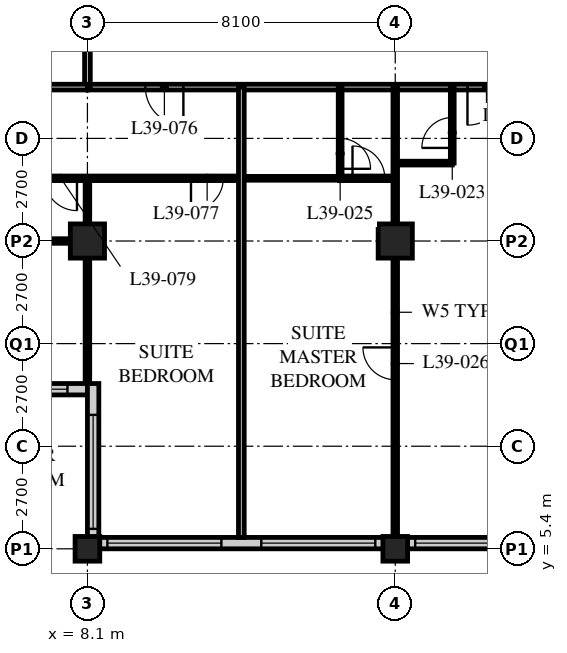
"""IFC4 building model, lengths in metres.
Left out: names, types, materials, properties, quantities, classifications, styles, units other than length and angle.
Written with IfcOpenShell. Run it as: python <this file> out.ifc"""

import sys

from ifc_helpers import new_model, si_unit, direction, frame, frame_2d, origin, origin_2d, place, context, subcontext, project, spatial, rectangle, hollow_rectangle, extrude, element, fill, save


model = new_model("IFC4")
c1 = context("Model", 3, precision=1e-05, world=origin(), true_north=direction((0.0, 1.0)))
c2 = subcontext(c1, "Body", "Model", "MODEL_VIEW")
j1 = project(units=[si_unit("LENGTHUNIT", "METRE"), si_unit("PLANEANGLEUNIT", "RADIAN")], contexts=[c1])
p1 = place(None, origin())
s1 = spatial("IfcSite", under=j1, at=p1, CompositionType="ELEMENT")
p2 = place(p1, origin())
s2 = spatial("IfcBuilding", under=s1, at=p2, CompositionType="ELEMENT")
p3 = place(p2, frame((0.0, 0.0, 151.0)))
s3 = spatial("IfcBuildingStorey", under=s2, at=p3, CompositionType="ELEMENT", Elevation=151.0)
p4 = place(p3, frame((8.1, 5.4, 0.0), z_axis=(0.0, 0.0, 1.0), x_axis=(1.0, 0.0, 0.0)))
e1 = element("IfcColumn", 1, at=p4, inside=s3, PredefinedType="COLUMN", context=c2, shape_type="SweptSolid", body=[
    extrude(hollow_rectangle(XDim=0.65, YDim=0.65, WallThickness=0.055, at=origin_2d()), origin(), (0.0, 0.0, 1.0), 3.4),
])
p5 = place(p3, frame((8.1, 13.5, 0.0), z_axis=(0.0, 0.0, 1.0), x_axis=(1.0, 0.0, 0.0)))
e2 = element("IfcColumn", 2, at=p5, inside=s3, PredefinedType="COLUMN", context=c2, shape_type="SweptSolid", body=[
    extrude(hollow_rectangle(XDim=0.9, YDim=0.9, WallThickness=0.1, at=origin_2d()), origin(), (0.0, 0.0, 1.0), 3.4),
])
p6 = place(p3, frame((16.2, 5.4, 0.0), z_axis=(0.0, 0.0, 1.0), x_axis=(1.0, 0.0, 0.0)))
e3 = element("IfcColumn", 3, at=p6, inside=s3, PredefinedType="COLUMN", context=c2, shape_type="SweptSolid", body=[
    extrude(hollow_rectangle(XDim=0.65, YDim=0.65, WallThickness=0.055, at=origin_2d()), origin(), (0.0, 0.0, 1.0), 3.4),
])
p7 = place(p3, frame((16.2, 13.5, 0.0), z_axis=(0.0, 0.0, 1.0), x_axis=(1.0, 0.0, 0.0)))
e4 = element("IfcColumn", 4, at=p7, inside=s3, PredefinedType="COLUMN", context=c2, shape_type="SweptSolid", body=[
    extrude(hollow_rectangle(XDim=0.9, YDim=0.9, WallThickness=0.1, at=origin_2d()), origin(), (0.0, 0.0, 1.0), 3.4),
])
p8 = place(p3, frame((8.4, 5.55, 0.0), z_axis=(0.0, 0.0, 1.0), x_axis=(1.0, 0.0, 0.0)))
e5 = element("IfcWall", 5, at=p8, inside=s3, PredefinedType="SOLIDWALL", context=c2, shape_type="SweptSolid", body=[
    extrude(rectangle(XDim=40.2, YDim=0.3, at=frame_2d((20.1, 0.0))), origin(), (0.0, 0.0, 1.0), 3.19),
])
p9 = place(p8, frame((0.225, 0.0, 0.9)))
e6 = element("IfcOpeningElement", 6, at=p9, cuts=e5, PredefinedType="OPENING", context=c2, shape_type="SweptSolid", body=[
    extrude(rectangle(XDim=3.0, YDim=1.4, at=frame_2d((1.5, 0.7))), frame((0.0, 0.16, 0.0), z_axis=(0.0, -1.0, 0.0), x_axis=(1.0, 0.0, 0.0)), (0.0, 0.0, 1.0), 0.32),
])
p10 = place(p8, frame((4.275, 0.0, 0.9)))
e7 = element("IfcOpeningElement", 7, at=p10, cuts=e5, PredefinedType="OPENING", context=c2, shape_type="SweptSolid", body=[
    extrude(rectangle(XDim=3.0, YDim=1.4, at=frame_2d((1.5, 0.7))), frame((0.0, 0.16, 0.0), z_axis=(0.0, -1.0, 0.0), x_axis=(1.0, 0.0, 0.0)), (0.0, 0.0, 1.0), 0.32),
])
p11 = place(p8, frame((8.325, 0.0, 0.9)))
e8 = element("IfcOpeningElement", 8, at=p11, cuts=e5, PredefinedType="OPENING", context=c2, shape_type="SweptSolid", body=[
    extrude(rectangle(XDim=3.0, YDim=1.4, at=frame_2d((1.5, 0.7))), frame((0.0, 0.16, 0.0), z_axis=(0.0, -1.0, 0.0), x_axis=(1.0, 0.0, 0.0)), (0.0, 0.0, 1.0), 0.32),
])
p12 = place(p8, frame((12.375, 0.0, 0.9)))
e9 = element("IfcOpeningElement", 9, at=p12, cuts=e5, PredefinedType="OPENING", context=c2, shape_type="SweptSolid", body=[
    extrude(rectangle(XDim=3.0, YDim=1.4, at=frame_2d((1.5, 0.7))), frame((0.0, 0.16, 0.0), z_axis=(0.0, -1.0, 0.0), x_axis=(1.0, 0.0, 0.0)), (0.0, 0.0, 1.0), 0.32),
])
p13 = place(p8, frame((16.425, 0.0, 0.9)))
e10 = element("IfcOpeningElement", 10, at=p13, cuts=e5, PredefinedType="OPENING", context=c2, shape_type="SweptSolid", body=[
    extrude(rectangle(XDim=3.0, YDim=1.4, at=frame_2d((1.5, 0.7))), frame((0.0, 0.16, 0.0), z_axis=(0.0, -1.0, 0.0), x_axis=(1.0, 0.0, 0.0)), (0.0, 0.0, 1.0), 0.32),
])
p14 = place(p8, frame((20.475, 0.0, 0.9)))
e11 = element("IfcOpeningElement", 11, at=p14, cuts=e5, PredefinedType="OPENING", context=c2, shape_type="SweptSolid", body=[
    extrude(rectangle(XDim=3.0, YDim=1.4, at=frame_2d((1.5, 0.7))), frame((0.0, 0.16, 0.0), z_axis=(0.0, -1.0, 0.0), x_axis=(1.0, 0.0, 0.0)), (0.0, 0.0, 1.0), 0.32),
])
p15 = place(p8, frame((24.525, 0.0, 0.9)))
e12 = element("IfcOpeningElement", 12, at=p15, cuts=e5, PredefinedType="OPENING", context=c2, shape_type="SweptSolid", body=[
    extrude(rectangle(XDim=3.0, YDim=1.4, at=frame_2d((1.5, 0.7))), frame((0.0, 0.16, 0.0), z_axis=(0.0, -1.0, 0.0), x_axis=(1.0, 0.0, 0.0)), (0.0, 0.0, 1.0), 0.32),
])
p16 = place(p8, frame((28.575, 0.0, 0.9)))
e13 = element("IfcOpeningElement", 13, at=p16, cuts=e5, PredefinedType="OPENING", context=c2, shape_type="SweptSolid", body=[
    extrude(rectangle(XDim=3.0, YDim=1.4, at=frame_2d((1.5, 0.7))), frame((0.0, 0.16, 0.0), z_axis=(0.0, -1.0, 0.0), x_axis=(1.0, 0.0, 0.0)), (0.0, 0.0, 1.0), 0.32),
])
p17 = place(p8, frame((32.625, 0.0, 0.9)))
e14 = element("IfcOpeningElement", 14, at=p17, cuts=e5, PredefinedType="OPENING", context=c2, shape_type="SweptSolid", body=[
    extrude(rectangle(XDim=3.0, YDim=1.4, at=frame_2d((1.5, 0.7))), frame((0.0, 0.16, 0.0), z_axis=(0.0, -1.0, 0.0), x_axis=(1.0, 0.0, 0.0)), (0.0, 0.0, 1.0), 0.32),
])
p18 = place(p8, frame((36.675, 0.0, 0.9)))
e15 = element("IfcOpeningElement", 15, at=p18, cuts=e5, PredefinedType="OPENING", context=c2, shape_type="SweptSolid", body=[
    extrude(rectangle(XDim=3.0, YDim=1.4, at=frame_2d((1.5, 0.7))), frame((0.0, 0.16, 0.0), z_axis=(0.0, -1.0, 0.0), x_axis=(1.0, 0.0, 0.0)), (0.0, 0.0, 1.0), 0.32),
])
p19 = place(p3, frame((4.35, 9.6, 0.0), z_axis=(0.0, 0.0, 1.0), x_axis=(1.0, 0.0, 0.0)))
e16 = element("IfcWall", 16, at=p19, inside=s3, PredefinedType="SOLIDWALL", context=c2, shape_type="SweptSolid", body=[
    extrude(rectangle(XDim=3.75, YDim=0.3, at=frame_2d((1.875, 0.0))), origin(), (0.0, 0.0, 1.0), 3.19),
])
p20 = place(p19, frame((0.225, 0.0, 0.9)))
e17 = element("IfcOpeningElement", 17, at=p20, cuts=e16, PredefinedType="OPENING", context=c2, shape_type="SweptSolid", body=[
    extrude(rectangle(XDim=3.0, YDim=1.4, at=frame_2d((1.5, 0.7))), frame((0.0, 0.16, 0.0), z_axis=(0.0, -1.0, 0.0), x_axis=(1.0, 0.0, 0.0)), (0.0, 0.0, 1.0), 0.32),
])
p21 = place(p3, frame((8.25, 9.75, 0.0), z_axis=(0.0, 0.0, 1.0), x_axis=(0.0, -1.0, 0.0)))
e18 = element("IfcWall", 18, at=p21, inside=s3, PredefinedType="SOLIDWALL", context=c2, shape_type="SweptSolid", body=[
    extrude(rectangle(XDim=4.35, YDim=0.3, at=frame_2d((2.175, 0.0))), origin(), (0.0, 0.0, 1.0), 3.19),
])
p22 = place(p21, frame((0.825, 0.0, 0.9)))
e19 = element("IfcOpeningElement", 19, at=p22, cuts=e18, PredefinedType="OPENING", context=c2, shape_type="SweptSolid", body=[
    extrude(rectangle(XDim=3.0, YDim=1.4, at=frame_2d((1.5, 0.7))), frame((0.0, 0.16, 0.0), z_axis=(0.0, -1.0, 0.0), x_axis=(1.0, 0.0, 0.0)), (0.0, 0.0, 1.0), 0.32),
])
p23 = place(p3, frame((8.1, 17.55, 0.0), z_axis=(0.0, 0.0, 1.0), x_axis=(1.0, 0.0, 0.0)))
e20 = element("IfcWall", 20, at=p23, inside=s3, PredefinedType="PARTITIONING", context=c2, shape_type="SweptSolid", body=[
    extrude(rectangle(XDim=40.5, YDim=0.15, at=frame_2d((20.25, 0.0))), origin(), (0.0, 0.0, 1.0), 3.19),
])
p24 = place(p23, frame((10.0, 0.0, 0.0)))
e21 = element("IfcOpeningElement", 21, at=p24, cuts=e20, PredefinedType="OPENING", context=c2, shape_type="SweptSolid", body=[
    extrude(rectangle(XDim=1.0, YDim=2.1, at=frame_2d((0.5, 1.05))), frame((0.0, 0.085, 0.0), z_axis=(0.0, -1.0, 0.0), x_axis=(1.0, 0.0, 0.0)), (0.0, 0.0, 1.0), 0.17),
])
p25 = place(p23, frame((22.15, 0.0, 0.0)))
e22 = element("IfcOpeningElement", 22, at=p25, cuts=e20, PredefinedType="OPENING", context=c2, shape_type="SweptSolid", body=[
    extrude(rectangle(XDim=1.0, YDim=2.1, at=frame_2d((0.5, 1.05))), frame((0.0, 0.085, 0.0), z_axis=(0.0, -1.0, 0.0), x_axis=(1.0, 0.0, 0.0)), (0.0, 0.0, 1.0), 0.17),
])
p26 = place(p23, frame((30.8, 0.0, 0.0)))
e23 = element("IfcOpeningElement", 23, at=p26, cuts=e20, PredefinedType="OPENING", context=c2, shape_type="SweptSolid", body=[
    extrude(rectangle(XDim=1.0, YDim=2.1, at=frame_2d((0.5, 1.05))), frame((0.0, 0.085, 0.0), z_axis=(0.0, -1.0, 0.0), x_axis=(1.0, 0.0, 0.0)), (0.0, 0.0, 1.0), 0.17),
])
p27 = place(p23, frame((34.85, 0.0, 0.0)))
e24 = element("IfcOpeningElement", 24, at=p27, cuts=e20, PredefinedType="OPENING", context=c2, shape_type="SweptSolid", body=[
    extrude(rectangle(XDim=1.0, YDim=2.1, at=frame_2d((0.5, 1.05))), frame((0.0, 0.085, 0.0), z_axis=(0.0, -1.0, 0.0), x_axis=(1.0, 0.0, 0.0)), (0.0, 0.0, 1.0), 0.17),
])
p28 = place(p23, frame((1.525, 0.0, 0.0)))
e25 = element("IfcOpeningElement", 25, at=p28, cuts=e20, PredefinedType="OPENING", context=c2, shape_type="SweptSolid", body=[
    extrude(rectangle(XDim=1.0, YDim=2.1, at=frame_2d((0.5, 1.05))), frame((0.0, 0.085, 0.0), z_axis=(0.0, -1.0, 0.0), x_axis=(1.0, 0.0, 0.0)), (0.0, 0.0, 1.0), 0.17),
])
p29 = place(p23, frame((37.975, 0.0, 0.0)))
e26 = element("IfcOpeningElement", 26, at=p29, cuts=e20, PredefinedType="OPENING", context=c2, shape_type="SweptSolid", body=[
    extrude(rectangle(XDim=1.0, YDim=2.1, at=frame_2d((0.5, 1.05))), frame((0.0, 0.085, 0.0), z_axis=(0.0, -1.0, 0.0), x_axis=(1.0, 0.0, 0.0)), (0.0, 0.0, 1.0), 0.17),
])
p30 = place(p3, frame((8.1, 17.55, 0.0), z_axis=(0.0, 0.0, 1.0), x_axis=(0.0, 1.0, 0.0)))
e27 = element("IfcWall", 27, at=p30, inside=s3, PredefinedType="PARTITIONING", context=c2, shape_type="SweptSolid", body=[
    extrude(rectangle(XDim=28.35, YDim=0.15, at=frame_2d((14.175, 0.0))), origin(), (0.0, 0.0, 1.0), 2.42),
])
p31 = place(p30, frame((5.95, 0.0, 0.0)))
e28 = element("IfcOpeningElement", 28, at=p31, cuts=e27, PredefinedType="OPENING", context=c2, shape_type="SweptSolid", body=[
    extrude(rectangle(XDim=1.0, YDim=2.1, at=frame_2d((0.5, 1.05))), frame((0.0, 0.085, 0.0), z_axis=(0.0, -1.0, 0.0), x_axis=(1.0, 0.0, 0.0)), (0.0, 0.0, 1.0), 0.17),
])
p32 = place(p30, frame((16.8, 0.0, 0.0)))
e29 = element("IfcOpeningElement", 29, at=p32, cuts=e27, PredefinedType="OPENING", context=c2, shape_type="SweptSolid", body=[
    extrude(rectangle(XDim=1.0, YDim=2.1, at=frame_2d((0.5, 1.05))), frame((0.0, 0.085, 0.0), z_axis=(0.0, -1.0, 0.0), x_axis=(1.0, 0.0, 0.0)), (0.0, 0.0, 1.0), 0.17),
])
p33 = place(p30, frame((22.7, 0.0, 0.0)))
e30 = element("IfcOpeningElement", 30, at=p33, cuts=e27, PredefinedType="OPENING", context=c2, shape_type="SweptSolid", body=[
    extrude(rectangle(XDim=1.0, YDim=2.1, at=frame_2d((0.5, 1.05))), frame((0.0, 0.085, 0.0), z_axis=(0.0, -1.0, 0.0), x_axis=(1.0, 0.0, 0.0)), (0.0, 0.0, 1.0), 0.17),
])
p34 = place(p30, frame((24.9, 0.0, 0.0)))
e31 = element("IfcOpeningElement", 31, at=p34, cuts=e27, PredefinedType="OPENING", context=c2, shape_type="SweptSolid", body=[
    extrude(rectangle(XDim=1.0, YDim=2.1, at=frame_2d((0.5, 1.05))), frame((0.0, 0.085, 0.0), z_axis=(0.0, -1.0, 0.0), x_axis=(1.0, 0.0, 0.0)), (0.0, 0.0, 1.0), 0.17),
])
p35 = place(p3, frame((16.2, 15.55, 0.0), z_axis=(0.0, 0.0, 1.0), x_axis=(1.0, 0.0, 0.0)))
e32 = element("IfcWall", 32, at=p35, inside=s3, PredefinedType="PARTITIONING", context=c2, shape_type="SweptSolid", body=[
    extrude(rectangle(XDim=1.5, YDim=0.1, at=frame_2d((0.75, 0.0))), origin(), (0.0, 0.0, 1.0), 3.19),
])
p36 = place(p3, frame((17.7, 17.55, 0.0), z_axis=(0.0, 0.0, 1.0), x_axis=(0.0, -1.0, 0.0)))
e33 = element("IfcWall", 33, at=p36, inside=s3, PredefinedType="PARTITIONING", context=c2, shape_type="SweptSolid", body=[
    extrude(rectangle(XDim=2.0, YDim=0.1, at=frame_2d((1.0, 0.0))), origin(), (0.0, 0.0, 1.0), 3.19),
])
p37 = place(p36, frame((0.8, 0.0, 0.0)))
e34 = element("IfcOpeningElement", 34, at=p37, cuts=e33, PredefinedType="OPENING", context=c2, shape_type="SweptSolid", body=[
    extrude(rectangle(XDim=0.8, YDim=2.1, at=frame_2d((0.4, 1.05))), frame((0.0, 0.06, 0.0), z_axis=(0.0, -1.0, 0.0), x_axis=(1.0, 0.0, 0.0)), (0.0, 0.0, 1.0), 0.12),
])
p38 = place(p3, frame((12.15, 15.15, 0.0), z_axis=(0.0, 0.0, 1.0), x_axis=(1.0, 0.0, 0.0)))
e35 = element("IfcWall", 35, at=p38, inside=s3, PredefinedType="PARTITIONING", context=c2, shape_type="SweptSolid", body=[
    extrude(rectangle(XDim=2.6, YDim=0.1, at=frame_2d((1.3, 0.0))), origin(), (0.0, 0.0, 1.0), 3.19),
])
p39 = place(p3, frame((14.75, 17.55, 0.0), z_axis=(0.0, 0.0, 1.0), x_axis=(0.0, -1.0, 0.0)))
e36 = element("IfcWall", 36, at=p39, inside=s3, PredefinedType="PARTITIONING", context=c2, shape_type="SweptSolid", body=[
    extrude(rectangle(XDim=2.4, YDim=0.1, at=frame_2d((1.2, 0.0))), origin(), (0.0, 0.0, 1.0), 3.19),
])
p40 = place(p39, frame((1.35, 0.0, 0.0)))
e37 = element("IfcOpeningElement", 37, at=p40, cuts=e36, PredefinedType="OPENING", context=c2, shape_type="SweptSolid", body=[
    extrude(rectangle(XDim=0.8, YDim=2.1, at=frame_2d((0.4, 1.05))), frame((0.0, 0.06, 0.0), z_axis=(0.0, -1.0, 0.0), x_axis=(1.0, 0.0, 0.0)), (0.0, 0.0, 1.0), 0.12),
])
p41 = place(p3, frame((16.2, 17.55, 0.0), z_axis=(0.0, 0.0, 1.0), x_axis=(0.0, -1.0, 0.0)))
e38 = element("IfcWall", 38, at=p41, inside=s3, PredefinedType="PARTITIONING", context=c2, shape_type="SweptSolid", body=[
    extrude(rectangle(XDim=11.85, YDim=0.12, at=frame_2d((5.925, 0.0))), origin(), (0.0, 0.0, 1.0), 2.42),
])
p42 = place(p41, frame((6.85, 0.0, 0.0)))
e39 = element("IfcOpeningElement", 39, at=p42, cuts=e38, PredefinedType="OPENING", context=c2, shape_type="SweptSolid", body=[
    extrude(rectangle(XDim=0.85, YDim=2.1, at=frame_2d((0.425, 1.05))), frame((0.0, 0.07, 0.0), z_axis=(0.0, -1.0, 0.0), x_axis=(1.0, 0.0, 0.0)), (0.0, 0.0, 1.0), 0.14),
])
p43 = place(p3, frame((4.1, 15.15, 0.0), z_axis=(0.0, 0.0, 1.0), x_axis=(1.0, 0.0, 0.0)))
e40 = element("IfcWall", 40, at=p43, inside=s3, PredefinedType="PARTITIONING", context=c2, shape_type="SweptSolid", body=[
    extrude(rectangle(XDim=8.05, YDim=0.12, at=frame_2d((4.025, 0.0))), origin(), (0.0, 0.0, 1.0), 3.19),
])
p44 = place(p43, frame((6.725, 0.0, 0.0)))
e41 = element("IfcOpeningElement", 41, at=p44, cuts=e40, PredefinedType="OPENING", context=c2, shape_type="SweptSolid", body=[
    extrude(rectangle(XDim=0.85, YDim=2.1, at=frame_2d((0.425, 1.05))), frame((0.0, 0.07, 0.0), z_axis=(0.0, -1.0, 0.0), x_axis=(1.0, 0.0, 0.0)), (0.0, 0.0, 1.0), 0.14),
])
p45 = place(p43, frame((2.875, 0.0, 0.0)))
e42 = element("IfcOpeningElement", 42, at=p45, cuts=e40, PredefinedType="OPENING", context=c2, shape_type="SweptSolid", body=[
    extrude(rectangle(XDim=0.85, YDim=2.1, at=frame_2d((0.425, 1.05))), frame((0.0, 0.07, 0.0), z_axis=(0.0, -1.0, 0.0), x_axis=(1.0, 0.0, 0.0)), (0.0, 0.0, 1.0), 0.14),
])
p46 = place(p3, frame((8.1, 15.15, 0.0), z_axis=(0.0, 0.0, 1.0), x_axis=(0.0, -1.0, 0.0)))
e43 = element("IfcWall", 43, at=p46, inside=s3, PredefinedType="PARTITIONING", context=c2, shape_type="SweptSolid", body=[
    extrude(rectangle(XDim=5.4, YDim=0.12, at=frame_2d((2.7, 0.0))), origin(), (0.0, 0.0, 1.0), 2.42),
])
p47 = place(p3, frame((8.1, 13.5, 0.0), z_axis=(0.0, 0.0, 1.0), x_axis=(-1.0, 0.0, 0.0)))
e44 = element("IfcWall", 44, at=p47, inside=s3, PredefinedType="PARTITIONING", context=c2, shape_type="SweptSolid", body=[
    extrude(rectangle(XDim=3.75, YDim=0.12, at=frame_2d((1.875, 0.0))), origin(), (0.0, 0.0, 1.0), 2.42),
])
p48 = place(p47, frame((1.875, 0.0, 0.0)))
e45 = element("IfcOpeningElement", 45, at=p48, cuts=e44, PredefinedType="OPENING", context=c2, shape_type="SweptSolid", body=[
    extrude(rectangle(XDim=0.85, YDim=2.1, at=frame_2d((0.425, 1.05))), frame((0.0, 0.07, 0.0), z_axis=(0.0, -1.0, 0.0), x_axis=(1.0, 0.0, 0.0)), (0.0, 0.0, 1.0), 0.14),
])
p49 = place(p3, frame((0.3, 17.55, 0.0), z_axis=(0.0, 0.0, 1.0), x_axis=(1.0, 0.0, 0.0)))
e46 = element("IfcWall", 46, at=p49, inside=s3, PredefinedType="PARTITIONING", context=c2, shape_type="SweptSolid", body=[
    extrude(rectangle(XDim=7.8, YDim=0.15, at=frame_2d((3.9, 0.0))), origin(), (0.0, 0.0, 1.0), 3.19),
])
p50 = place(p3, frame((12.15, 17.55, 0.0), z_axis=(0.0, 0.0, 1.0), x_axis=(0.0, -1.0, 0.0)))
e47 = element("IfcWall", 47, at=p50, inside=s3, PredefinedType="PARTITIONING", context=c2, shape_type="SweptSolid", body=[
    extrude(rectangle(XDim=11.85, YDim=0.15, at=frame_2d((5.925, 0.0))), origin(), (0.0, 0.0, 1.0), 3.19),
])
p51 = place(p3, frame((16.2, 15.15, 0.0), z_axis=(0.0, 0.0, 1.0), x_axis=(-1.0, 0.0, 0.0)))
e48 = element("IfcWall", 48, at=p51, inside=s3, PredefinedType="PARTITIONING", context=c2, shape_type="SweptSolid", body=[
    extrude(rectangle(XDim=1.46, YDim=0.12, at=frame_2d((0.73, 0.0))), origin(), (0.0, 0.0, 1.0), 3.19),
])
p52 = place(p51, frame((0.275, 0.0, 0.0)))
e49 = element("IfcOpeningElement", 49, at=p52, cuts=e48, PredefinedType="OPENING", context=c2, shape_type="SweptSolid", body=[
    extrude(rectangle(XDim=0.85, YDim=2.1, at=frame_2d((0.425, 1.05))), frame((0.0, 0.07, 0.0), z_axis=(0.0, -1.0, 0.0), x_axis=(1.0, 0.0, 0.0)), (0.0, 0.0, 1.0), 0.14),
])
p53 = place(p9, origin())
e50 = element("IfcWindow", 50, at=p53, inside=s3, PartitioningType="SINGLE_PANEL", PredefinedType="WINDOW", context=c2, shape_type="SweptSolid", body=[
    extrude(rectangle(XDim=3.0, YDim=1.4, at=frame_2d((1.5, 0.7))), frame((0.0, 0.03, 0.0), z_axis=(0.0, -1.0, 0.0), x_axis=(1.0, 0.0, 0.0)), (0.0, 0.0, 1.0), 0.06),
])
fill(e6, e50)
p54 = place(p10, origin())
e51 = element("IfcWindow", 51, at=p54, inside=s3, PartitioningType="SINGLE_PANEL", PredefinedType="WINDOW", context=c2, shape_type="SweptSolid", body=[
    extrude(rectangle(XDim=3.0, YDim=1.4, at=frame_2d((1.5, 0.7))), frame((0.0, 0.03, 0.0), z_axis=(0.0, -1.0, 0.0), x_axis=(1.0, 0.0, 0.0)), (0.0, 0.0, 1.0), 0.06),
])
fill(e7, e51)
p55 = place(p11, origin())
e52 = element("IfcWindow", 52, at=p55, inside=s3, PartitioningType="SINGLE_PANEL", PredefinedType="WINDOW", context=c2, shape_type="SweptSolid", body=[
    extrude(rectangle(XDim=3.0, YDim=1.4, at=frame_2d((1.5, 0.7))), frame((0.0, 0.03, 0.0), z_axis=(0.0, -1.0, 0.0), x_axis=(1.0, 0.0, 0.0)), (0.0, 0.0, 1.0), 0.06),
])
fill(e8, e52)
p56 = place(p20, origin())
e53 = element("IfcWindow", 53, at=p56, inside=s3, PartitioningType="SINGLE_PANEL", PredefinedType="WINDOW", context=c2, shape_type="SweptSolid", body=[
    extrude(rectangle(XDim=3.0, YDim=1.4, at=frame_2d((1.5, 0.7))), frame((0.0, 0.03, 0.0), z_axis=(0.0, -1.0, 0.0), x_axis=(1.0, 0.0, 0.0)), (0.0, 0.0, 1.0), 0.06),
])
fill(e17, e53)
p57 = place(p22, origin())
e54 = element("IfcWindow", 54, at=p57, inside=s3, PartitioningType="SINGLE_PANEL", PredefinedType="WINDOW", context=c2, shape_type="SweptSolid", body=[
    extrude(rectangle(XDim=3.0, YDim=1.4, at=frame_2d((1.5, 0.7))), frame((0.0, 0.03, 0.0), z_axis=(0.0, -1.0, 0.0), x_axis=(1.0, 0.0, 0.0)), (0.0, 0.0, 1.0), 0.06),
])
fill(e19, e54)
p58 = place(p37, origin())
e55 = element("IfcDoor", 55, at=p58, inside=s3, OperationType="SINGLE_SWING_LEFT", PredefinedType="DOOR", context=c2, shape_type="SweptSolid", body=[
    extrude(rectangle(XDim=0.8, YDim=2.1, at=frame_2d((0.4, 1.05))), frame((0.0, 0.025, 0.0), z_axis=(0.0, -1.0, 0.0), x_axis=(1.0, 0.0, 0.0)), (0.0, 0.0, 1.0), 0.05),
])
fill(e34, e55)
p59 = place(p24, origin())
e56 = element("IfcDoor", 56, at=p59, inside=s3, OperationType="SINGLE_SWING_RIGHT", PredefinedType="DOOR", context=c2, shape_type="SweptSolid", body=[
    extrude(rectangle(XDim=1.0, YDim=2.1, at=frame_2d((0.5, 1.05))), frame((0.0, 0.025, 0.0), z_axis=(0.0, -1.0, 0.0), x_axis=(1.0, 0.0, 0.0)), (0.0, 0.0, 1.0), 0.05),
])
fill(e21, e56)
p60 = place(p40, origin())
e57 = element("IfcDoor", 57, at=p60, inside=s3, OperationType="SINGLE_SWING_RIGHT", PredefinedType="DOOR", context=c2, shape_type="SweptSolid", body=[
    extrude(rectangle(XDim=0.8, YDim=2.1, at=frame_2d((0.4, 1.05))), frame((0.0, 0.025, 0.0), z_axis=(0.0, -1.0, 0.0), x_axis=(1.0, 0.0, 0.0)), (0.0, 0.0, 1.0), 0.05),
])
fill(e37, e57)
p61 = place(p42, origin())
e58 = element("IfcDoor", 58, at=p61, inside=s3, OperationType="SINGLE_SWING_RIGHT", PredefinedType="DOOR", context=c2, shape_type="SweptSolid", body=[
    extrude(rectangle(XDim=0.85, YDim=2.1, at=frame_2d((0.425, 1.05))), frame((0.0, 0.025, 0.0), z_axis=(0.0, -1.0, 0.0), x_axis=(1.0, 0.0, 0.0)), (0.0, 0.0, 1.0), 0.05),
])
fill(e39, e58)
p62 = place(p28, origin())
e59 = element("IfcDoor", 59, at=p62, inside=s3, OperationType="SINGLE_SWING_LEFT", PredefinedType="DOOR", context=c2, shape_type="SweptSolid", body=[
    extrude(rectangle(XDim=1.0, YDim=2.1, at=frame_2d((0.5, 1.05))), frame((0.0, 0.025, 0.0), z_axis=(0.0, -1.0, 0.0), x_axis=(1.0, 0.0, 0.0)), (0.0, 0.0, 1.0), 0.05),
])
fill(e25, e59)
p63 = place(p44, origin())
e60 = element("IfcDoor", 60, at=p63, inside=s3, OperationType="SINGLE_SWING_RIGHT", PredefinedType="DOOR", context=c2, shape_type="SweptSolid", body=[
    extrude(rectangle(XDim=0.85, YDim=2.1, at=frame_2d((0.425, 1.05))), frame((0.0, 0.025, 0.0), z_axis=(0.0, -1.0, 0.0), x_axis=(1.0, 0.0, 0.0)), (0.0, 0.0, 1.0), 0.05),
])
fill(e41, e60)
p64 = place(p45, origin())
e61 = element("IfcDoor", 61, at=p64, inside=s3, OperationType="SINGLE_SWING_LEFT", PredefinedType="DOOR", context=c2, shape_type="SweptSolid", body=[
    extrude(rectangle(XDim=0.85, YDim=2.1, at=frame_2d((0.425, 1.05))), frame((0.0, 0.025, 0.0), z_axis=(0.0, -1.0, 0.0), x_axis=(1.0, 0.0, 0.0)), (0.0, 0.0, 1.0), 0.05),
])
fill(e42, e61)
p65 = place(p52, origin())
e62 = element("IfcDoor", 62, at=p65, inside=s3, OperationType="SINGLE_SWING_LEFT", PredefinedType="DOOR", context=c2, shape_type="SweptSolid", body=[
    extrude(rectangle(XDim=0.85, YDim=2.1, at=frame_2d((0.425, 1.05))), frame((0.0, 0.025, 0.0), z_axis=(0.0, -1.0, 0.0), x_axis=(1.0, 0.0, 0.0)), (0.0, 0.0, 1.0), 0.05),
])
fill(e49, e62)
save(model, sys.argv[1])
